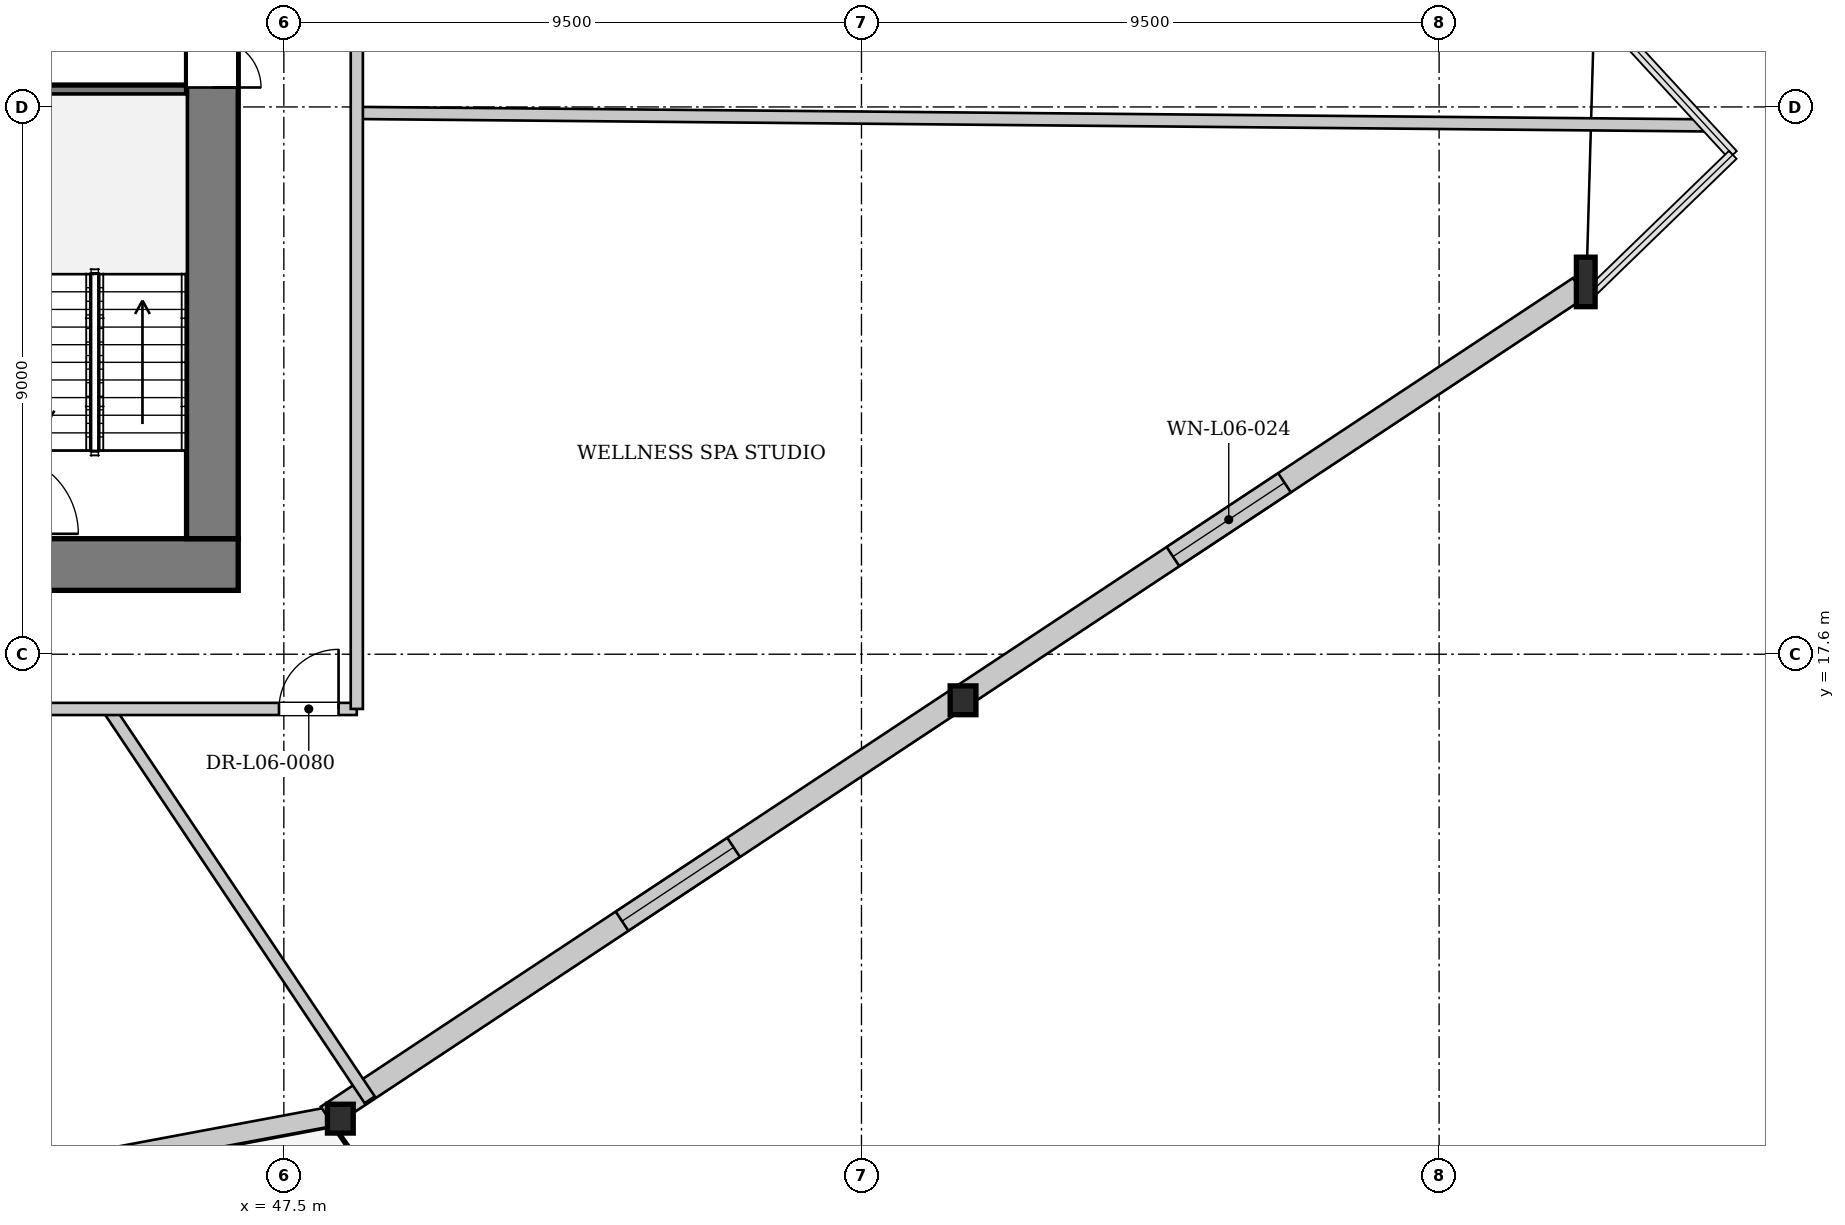
"""IFC4 building model, lengths in metres.
Left out: names, types, materials, properties, quantities, classifications, styles, units other than length and angle.
Written with IfcOpenShell. Run it as: python <this file> out.ifc"""

import sys

from ifc_helpers import new_model, si_unit, direction, frame, frame_2d, origin, origin_2d, place, context, subcontext, project, spatial, rectangle, i_section, extrude, source, transform, mapped, element, fill, save


model = new_model("IFC4")
c1 = context("Model", 3, precision=1e-05, world=origin(), true_north=direction((0.0, 1.0)))
c2 = subcontext(c1, "Body", "Model", "MODEL_VIEW")
j1 = project(units=[si_unit("LENGTHUNIT", "METRE"), si_unit("PLANEANGLEUNIT", "RADIAN")], contexts=[c1])
p1 = place(None, origin())
s1 = spatial("IfcSite", under=j1, at=p1, CompositionType="ELEMENT")
p2 = place(p1, origin())
s2 = spatial("IfcBuilding", under=s1, at=p2, CompositionType="ELEMENT")
p3 = place(p2, frame((0.0, 0.0, 29.3)))
s3 = spatial("IfcBuildingStorey", under=s2, at=p3, CompositionType="ELEMENT", Elevation=29.3)
m1 = source(origin(), c2, "Body", "SweptSolid", [
    extrude(i_section(OverallWidth=0.308, OverallDepth=0.814, WebThickness=0.021, FlangeThickness=0.04, at=origin_2d()), origin(), (0.0, 0.0, 1.0), 3.423),
])
p4 = place(p3, frame((68.911, 23.47, 0.0), z_axis=(0.000428000602, 0.147660207699, 0.989038057851), x_axis=(-0.999995799228, 0.002898538548, 0.0)))
e1 = element("IfcColumn", 1, at=p4, inside=s3, PredefinedType="COLUMN", context=c2, shape_type="MappedRepresentation", body=[
    mapped(m1, transform((0.0, 0.0, 0.0), x_axis=(1.0, 0.0, 0.0), y_axis=(0.0, 1.0, 0.0), z_axis=(0.0, 0.0, 1.0), scale=1.0)),
])
m2 = source(origin(), c2, "Body", "SweptSolid", [
    extrude(i_section(OverallWidth=0.424, OverallDepth=0.474, WebThickness=0.043, FlangeThickness=0.068, at=origin_2d()), origin(), (0.0, 0.0, 1.0), 3.401),
])
p5 = place(p3, frame((48.319, 9.843, 0.0), z_axis=(0.065114905761, 0.070427478006, 0.99538938079), x_axis=(-0.73425798924, 0.678870536433, 0.0)))
e2 = element("IfcColumn", 2, at=p5, inside=s3, PredefinedType="COLUMN", context=c2, shape_type="MappedRepresentation", body=[
    mapped(m2, transform((0.0, 0.0, 0.0), x_axis=(1.0, 0.0, 0.0), y_axis=(0.0, 1.0, 0.0), z_axis=(0.0, 0.0, 1.0), scale=1.0)),
])
m3 = source(origin(), c2, "Body", "SweptSolid", [
    extrude(i_section(OverallWidth=0.424, OverallDepth=0.474, WebThickness=0.043, FlangeThickness=0.068, at=origin_2d()), origin(), (0.0, 0.0, 1.0), 3.407),
])
p6 = place(p3, frame((58.615, 16.656, 0.0), z_axis=(0.032673963484, 0.109271478757, 0.99347478883), x_axis=(-0.958085265379, 0.286483200664, 0.0)))
e3 = element("IfcColumn", 3, at=p6, inside=s3, PredefinedType="COLUMN", context=c2, shape_type="MappedRepresentation", body=[
    mapped(m3, transform((0.0, 0.0, 0.0), x_axis=(1.0, 0.0, 0.0), y_axis=(0.0, 1.0, 0.0), z_axis=(0.0, 0.0, 1.0), scale=1.0)),
])
p7 = place(p3, frame((48.289, 10.0, 0.0), z_axis=(0.0, 0.0, 1.0), x_axis=(-0.9829231884, -0.184016319129, 0.0)))
e4 = element("IfcWall", 4, at=p7, inside=s3, PredefinedType="SOLIDWALL", context=c2, shape_type="SweptSolid", body=[
    extrude(rectangle(XDim=24.693, YDim=0.32, at=frame_2d((12.347, 0.0))), origin(), (0.0, 0.0, 1.0), 2.592),
])
p8 = place(p7, frame((7.352, 0.0, 0.0)))
e5 = element("IfcOpeningElement", 5, at=p8, cuts=e4, PredefinedType="OPENING", context=c2, shape_type="SweptSolid", body=[
    extrude(rectangle(XDim=1.1, YDim=2.3, at=frame_2d((0.55, 1.15))), frame((0.0, 0.17, 0.0), z_axis=(0.0, -1.0, 0.0), x_axis=(1.0, 0.0, 0.0)), (0.0, 0.0, 1.0), 0.34),
])
p9 = place(p7, frame((17.173, 0.0, 0.272)))
e6 = element("IfcOpeningElement", 6, at=p9, cuts=e4, PredefinedType="OPENING", context=c2, shape_type="SweptSolid", body=[
    extrude(rectangle(XDim=1.8, YDim=2.2, at=frame_2d((0.9, 1.1))), frame((0.0, 0.17, 0.0), z_axis=(0.0, -1.0, 0.0), x_axis=(1.0, 0.0, 0.0)), (0.0, 0.0, 1.0), 0.34),
])
p10 = place(p3, frame((68.806, 23.628, 0.0), z_axis=(0.0, 0.0, 1.0), x_axis=(-0.833933142534, -0.551865485225, 0.0)))
e7 = element("IfcWall", 7, at=p10, inside=s3, PredefinedType="SOLIDWALL", context=c2, shape_type="SweptSolid", body=[
    extrude(rectangle(XDim=24.693, YDim=0.38, at=frame_2d((12.346, 0.0))), origin(), (0.0, 0.0, 1.0), 2.592),
])
p11 = place(p10, frame((5.814, 0.0, 0.222)))
e8 = element("IfcOpeningElement", 8, at=p11, cuts=e7, PredefinedType="OPENING", context=c2, shape_type="SweptSolid", body=[
    extrude(rectangle(XDim=2.2, YDim=2.25, at=frame_2d((1.1, 1.125))), frame((0.0, 0.2, 0.0), z_axis=(0.0, -1.0, 0.0), x_axis=(1.0, 0.0, 0.0)), (0.0, 0.0, 1.0), 0.4),
])
p12 = place(p10, frame((16.679, 0.0, 0.222)))
e9 = element("IfcOpeningElement", 9, at=p12, cuts=e7, PredefinedType="OPENING", context=c2, shape_type="SweptSolid", body=[
    extrude(rectangle(XDim=2.2, YDim=2.25, at=frame_2d((1.1, 1.125))), frame((0.0, 0.2, 0.0), z_axis=(0.0, -1.0, 0.0), x_axis=(1.0, 0.0, 0.0)), (0.0, 0.0, 1.0), 0.4),
])
p13 = place(p3, frame((46.75, 19.075, 0.0), z_axis=(0.0, 0.0, 1.0), x_axis=(-1.0, 0.0, 0.0)))
e10 = element("IfcWall", 10, at=p13, inside=s3, PredefinedType="SHEAR", context=c2, shape_type="SweptSolid", body=[
    extrude(rectangle(XDim=17.5, YDim=0.85, at=frame_2d((8.75, 0.0))), origin(), (0.0, 0.0, 1.0), 3.3),
])
p14 = place(p13, frame((4.95, 0.0, 0.0)))
e11 = element("IfcOpeningElement", 11, at=p14, cuts=e10, PredefinedType="OPENING", context=c2, shape_type="SweptSolid", body=[
    extrude(rectangle(XDim=1.12, YDim=2.25, at=frame_2d((0.56, 1.125))), frame((0.0, 0.435, 0.0), z_axis=(0.0, -1.0, 0.0), x_axis=(1.0, 0.0, 0.0)), (0.0, 0.0, 1.0), 0.87),
])
p15 = place(p13, frame((11.45, 0.0, 0.0)))
e12 = element("IfcOpeningElement", 12, at=p15, cuts=e10, PredefinedType="OPENING", context=c2, shape_type="SweptSolid", body=[
    extrude(rectangle(XDim=1.12, YDim=2.25, at=frame_2d((0.56, 1.125))), frame((0.0, 0.435, 0.0), z_axis=(0.0, -1.0, 0.0), x_axis=(1.0, 0.0, 0.0)), (0.0, 0.0, 1.0), 0.87),
])
p16 = place(p3, frame((46.325, 33.7, 0.0), z_axis=(0.0, 0.0, 1.0), x_axis=(0.0, -1.0, 0.0)))
e13 = element("IfcWall", 13, at=p16, inside=s3, PredefinedType="SHEAR", context=c2, shape_type="SweptSolid", body=[
    extrude(rectangle(XDim=14.2, YDim=0.85, at=frame_2d((7.1, 0.0))), origin(), (0.0, 0.0, 1.0), 3.3),
])
p17 = place(p16, frame((5.18, 0.0, 0.0)))
e14 = element("IfcOpeningElement", 14, at=p17, cuts=e13, PredefinedType="OPENING", context=c2, shape_type="SweptSolid", body=[
    extrude(rectangle(XDim=1.6, YDim=2.2, at=frame_2d((0.8, 1.1))), frame((0.0, 0.435, 0.0), z_axis=(0.0, -1.0, 0.0), x_axis=(1.0, 0.0, 0.0)), (0.0, 0.0, 1.0), 0.87),
])
p18 = place(p3, frame((42.88, 26.88, 0.0), z_axis=(0.0, 0.0, 1.0), x_axis=(1.0, 0.0, 0.0)))
e15 = element("IfcWall", 15, at=p18, inside=s3, PredefinedType="PARTITIONING", context=c2, shape_type="SweptSolid", body=[
    extrude(rectangle(XDim=3.02, YDim=0.16, at=frame_2d((1.51, 0.0))), origin(), (0.0, 0.0, 1.0), 3.3),
])
p19 = place(p3, frame((44.617, 16.7, 0.0), z_axis=(0.0, 0.0, 1.0), x_axis=(0.555676244504, -0.831398767917, 0.0)))
e16 = element("IfcWall", 16, at=p19, inside=s3, PredefinedType="PARTITIONING", context=c2, shape_type="SweptSolid", body=[
    extrude(rectangle(XDim=7.732, YDim=0.2, at=frame_2d((3.866, 0.0))), origin(), (0.0, 0.0, 1.0), 2.785),
])
p20 = place(p3, frame((48.7, 26.501, 0.0), z_axis=(0.0, 0.0, 1.0), x_axis=(0.999957523386, -0.009216909663, 0.0)))
e17 = element("IfcWall", 17, at=p20, inside=s3, PredefinedType="PARTITIONING", context=c2, shape_type="SweptSolid", body=[
    extrude(rectangle(XDim=22.144, YDim=0.2, at=frame_2d((11.072, 0.0))), origin(), (0.0, 0.0, 1.0), 2.795),
])
p21 = place(p3, frame((27.3, 16.7, 0.0), z_axis=(0.0, 0.0, 1.0), x_axis=(1.0, 0.0, 0.0)))
e18 = element("IfcWall", 18, at=p21, inside=s3, PredefinedType="PARTITIONING", context=c2, shape_type="SweptSolid", body=[
    extrude(rectangle(XDim=21.4, YDim=0.2, at=frame_2d((10.7, 0.0))), origin(), (0.0, 0.0, 1.0), 3.3),
])
p22 = place(p21, frame((11.651, 0.0, 0.0)))
e19 = element("IfcOpeningElement", 19, at=p22, cuts=e18, PredefinedType="OPENING", context=c2, shape_type="SweptSolid", body=[
    extrude(rectangle(XDim=0.98, YDim=2.15, at=frame_2d((0.49, 1.075))), frame((0.0, 0.11, 0.0), z_axis=(0.0, -1.0, 0.0), x_axis=(1.0, 0.0, 0.0)), (0.0, 0.0, 1.0), 0.22),
])
p23 = place(p21, frame((20.12, 0.0, 0.0)))
e20 = element("IfcOpeningElement", 20, at=p23, cuts=e18, PredefinedType="OPENING", context=c2, shape_type="SweptSolid", body=[
    extrude(rectangle(XDim=0.98, YDim=2.15, at=frame_2d((0.49, 1.075))), frame((0.0, 0.11, 0.0), z_axis=(0.0, -1.0, 0.0), x_axis=(1.0, 0.0, 0.0)), (0.0, 0.0, 1.0), 0.22),
])
p24 = place(p21, frame((0.3, 0.0, 0.0)))
e21 = element("IfcOpeningElement", 21, at=p24, cuts=e18, PredefinedType="OPENING", context=c2, shape_type="SweptSolid", body=[
    extrude(rectangle(XDim=0.98, YDim=2.15, at=frame_2d((0.49, 1.075))), frame((0.0, 0.11, 0.0), z_axis=(0.0, -1.0, 0.0), x_axis=(1.0, 0.0, 0.0)), (0.0, 0.0, 1.0), 0.22),
])
p25 = place(p3, frame((48.7, 16.7, 0.0), z_axis=(0.0, 0.0, 1.0), x_axis=(0.0, 1.0, 0.0)))
e22 = element("IfcWall", 22, at=p25, inside=s3, PredefinedType="PARTITIONING", context=c2, shape_type="SweptSolid", body=[
    extrude(rectangle(XDim=19.8, YDim=0.2, at=frame_2d((9.9, 0.0))), origin(), (0.0, 0.0, 1.0), 3.3),
])
m4 = source(origin(), c2, "Body", "SweptSolid", [
    extrude(rectangle(XDim=2.2, YDim=2.25, at=frame_2d((1.1, 1.125))), frame((0.0, 0.03, 0.0), z_axis=(0.0, -1.0, 0.0), x_axis=(1.0, 0.0, 0.0)), (0.0, 0.0, 1.0), 0.06),
])
p26 = place(p11, origin())
e23 = element("IfcWindow", 23, at=p26, inside=s3, PartitioningType="SINGLE_PANEL", PredefinedType="WINDOW", context=c2, shape_type="MappedRepresentation", body=[
    mapped(m4, transform((0.0, 0.0, 0.0), x_axis=(1.0, 0.0, 0.0), y_axis=(0.0, 1.0, 0.0), z_axis=(0.0, 0.0, 1.0), scale=1.0)),
])
fill(e8, e23)
p27 = place(p12, origin())
e24 = element("IfcWindow", 24, at=p27, inside=s3, PartitioningType="SINGLE_PANEL", PredefinedType="WINDOW", context=c2, shape_type="MappedRepresentation", body=[
    mapped(m4, transform((0.0, 0.0, 0.0), x_axis=(1.0, 0.0, 0.0), y_axis=(0.0, 1.0, 0.0), z_axis=(0.0, 0.0, 1.0), scale=1.0)),
])
fill(e9, e24)
m5 = source(origin(), c2, "Body", "SweptSolid", [
    extrude(rectangle(XDim=1.6, YDim=2.2, at=frame_2d((0.8, 1.1))), frame((0.0, 0.025, 0.0), z_axis=(0.0, -1.0, 0.0), x_axis=(1.0, 0.0, 0.0)), (0.0, 0.0, 1.0), 0.05),
])
p28 = place(p17, origin())
e25 = element("IfcDoor", 25, at=p28, inside=s3, OperationType="DOUBLE_DOOR_SINGLE_SWING", PredefinedType="DOOR", context=c2, shape_type="MappedRepresentation", body=[
    mapped(m5, transform((0.0, 0.0, 0.0), x_axis=(1.0, 0.0, 0.0), y_axis=(0.0, 1.0, 0.0), z_axis=(0.0, 0.0, 1.0), scale=1.0)),
])
fill(e14, e25)
m6 = source(origin(), c2, "Body", "SweptSolid", [
    extrude(rectangle(XDim=0.98, YDim=2.15, at=frame_2d((0.49, 1.075))), frame((0.0, 0.025, 0.0), z_axis=(0.0, -1.0, 0.0), x_axis=(1.0, 0.0, 0.0)), (0.0, 0.0, 1.0), 0.05),
])
p29 = place(p23, origin())
e26 = element("IfcDoor", 26, at=p29, inside=s3, OperationType="SINGLE_SWING_RIGHT", PredefinedType="DOOR", context=c2, shape_type="MappedRepresentation", body=[
    mapped(m6, transform((0.0, 0.0, 0.0), x_axis=(1.0, 0.0, 0.0), y_axis=(0.0, 1.0, 0.0), z_axis=(0.0, 0.0, 1.0), scale=1.0)),
])
fill(e20, e26)
save(model, sys.argv[1])
